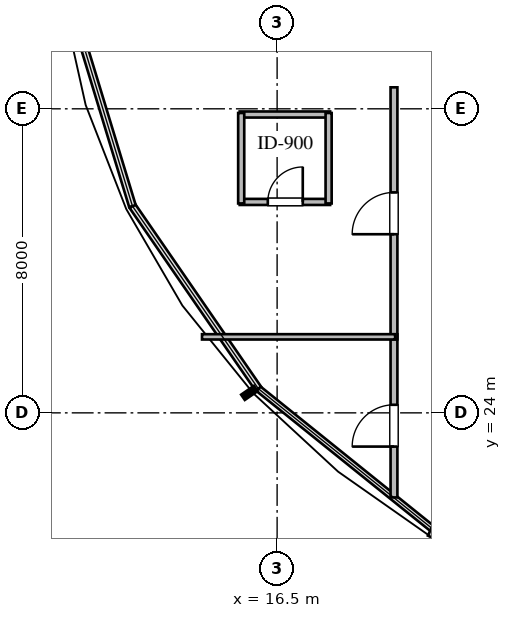
"""IFC4 building model, lengths in metres.
Left out: names, types, materials, properties, quantities, classifications, styles, units other than length and angle.
Written with IfcOpenShell. Run it as: python <this file> out.ifc"""

import sys

from ifc_helpers import new_model, si_unit, direction, frame, frame_2d, origin, place, context, subcontext, project, spatial, rectangle, extrude, element, fill, save


model = new_model("IFC4")
c1 = context("Model", 3, precision=1e-05, world=origin(), true_north=direction((0.0, 1.0)))
c2 = subcontext(c1, "Body", "Model", "MODEL_VIEW")
j1 = project(units=[si_unit("LENGTHUNIT", "METRE"), si_unit("PLANEANGLEUNIT", "RADIAN")], contexts=[c1])
p1 = place(None, origin())
s1 = spatial("IfcSite", under=j1, at=p1, CompositionType="ELEMENT")
p2 = place(p1, origin())
s2 = spatial("IfcBuilding", under=s1, at=p2, CompositionType="ELEMENT")
p3 = place(p2, frame((0.0, 0.0, 178.2)))
s3 = spatial("IfcBuildingStorey", under=s2, at=p3, CompositionType="ELEMENT", Elevation=178.2)
p4 = place(p3, frame((26.994, 17.88, 0.0), z_axis=(0.0, 0.0, 1.0), x_axis=(-0.905106920297, 0.425184034073, 0.0)))
e1 = element("IfcWall", 1, at=p4, inside=s3, PredefinedType="STANDARD", context=c2, shape_type="SweptSolid", body=[
    extrude(rectangle(XDim=7.136, YDim=0.32, at=frame_2d((3.568, 0.0))), origin(), (0.0, 0.0, 1.0), 2.577),
])
p5 = place(p3, frame((15.515, 29.55, 0.0), z_axis=(0.0, 0.0, 1.0), x_axis=(1.0, 0.0, 0.0)))
e2 = element("IfcWall", 2, at=p5, inside=s3, PredefinedType="PLUMBINGWALL", context=c2, shape_type="SweptSolid", body=[
    extrude(rectangle(XDim=2.38, YDim=0.16, at=frame_2d((1.19, 0.0))), origin(), (0.0, 0.0, 1.0), 3.28),
])
p6 = place(p5, frame((0.74, 0.0, 0.0)))
e3 = element("IfcOpeningElement", 3, at=p6, cuts=e2, PredefinedType="OPENING", context=c2, shape_type="SweptSolid", body=[
    extrude(rectangle(XDim=0.92, YDim=2.1, at=frame_2d((0.46, 1.05))), frame((0.0, 0.09, 0.0), z_axis=(0.0, -1.0, 0.0), x_axis=(1.0, 0.0, 0.0)), (0.0, 0.0, 1.0), 0.18),
])
p7 = place(p3, frame((15.515, 31.85, 0.0), z_axis=(0.0, 0.0, 1.0), x_axis=(1.0, 0.0, 0.0)))
e4 = element("IfcWall", 4, at=p7, inside=s3, PredefinedType="PLUMBINGWALL", context=c2, shape_type="SweptSolid", body=[
    extrude(rectangle(XDim=2.38, YDim=0.16, at=frame_2d((1.19, 0.0))), origin(), (0.0, 0.0, 1.0), 3.28),
])
for number, where, z_axis, x_axis in (
    (5, (15.555, 29.51, 0.0), (0.0, 0.0, 1.0), (0.0, 1.0, 0.0)),
    (6, (17.855, 29.51, 0.0), (0.0, 0.0, 1.0), (0.0, 1.0, 0.0)),
):
    element("IfcWall", number, at=place(p3, frame(where, z_axis=z_axis, x_axis=x_axis)), inside=s3, PredefinedType="PLUMBINGWALL", context=c2, shape_type="SweptSolid", body=[
        extrude(rectangle(XDim=2.38, YDim=0.16, at=frame_2d((1.19, 0.0))), origin(), (0.0, 0.0, 1.0), 3.28),
    ])
p8 = place(p3, frame((19.575, 21.775, 0.0), z_axis=(0.0, 0.0, 1.0), x_axis=(0.0, 1.0, 0.0)))
e7 = element("IfcWall", 7, at=p8, inside=s3, PredefinedType="PARTITIONING", context=c2, shape_type="SweptSolid", body=[
    extrude(rectangle(XDim=4.29, YDim=0.18, at=frame_2d((2.145, 0.0))), origin(), (0.0, 0.0, 1.0), 3.28),
])
p9 = place(p8, frame((1.338, 0.0, 0.0)))
e8 = element("IfcOpeningElement", 8, at=p9, cuts=e7, PredefinedType="OPENING", context=c2, shape_type="SweptSolid", body=[
    extrude(rectangle(XDim=1.1, YDim=2.1, at=frame_2d((0.55, 1.05))), frame((0.0, 0.1, 0.0), z_axis=(0.0, -1.0, 0.0), x_axis=(1.0, 0.0, 0.0)), (0.0, 0.0, 1.0), 0.2),
])
p10 = place(p3, frame((19.575, 25.935, 0.0), z_axis=(0.0, 0.0, 1.0), x_axis=(0.0, 1.0, 0.0)))
e9 = element("IfcWall", 9, at=p10, inside=s3, PredefinedType="PARTITIONING", context=c2, shape_type="SweptSolid", body=[
    extrude(rectangle(XDim=6.63, YDim=0.18, at=frame_2d((3.315, 0.0))), origin(), (0.0, 0.0, 1.0), 2.577),
])
p11 = place(p10, frame((2.765, 0.0, 0.0)))
e10 = element("IfcOpeningElement", 10, at=p11, cuts=e9, PredefinedType="OPENING", context=c2, shape_type="SweptSolid", body=[
    extrude(rectangle(XDim=1.1, YDim=2.1, at=frame_2d((0.55, 1.05))), frame((0.0, 0.1, 0.0), z_axis=(0.0, -1.0, 0.0), x_axis=(1.0, 0.0, 0.0)), (0.0, 0.0, 1.0), 0.2),
])
p12 = place(p3, frame((14.524, 26.0, 0.0), z_axis=(0.0, 0.0, 1.0), x_axis=(1.0, 0.0, 0.0)))
e11 = element("IfcWall", 11, at=p12, inside=s3, PredefinedType="PARTITIONING", context=c2, shape_type="SweptSolid", body=[
    extrude(rectangle(XDim=5.081, YDim=0.14, at=frame_2d((2.541, 0.0))), origin(), (0.0, 0.0, 1.0), 3.28),
])
p13 = place(p6, origin())
e12 = element("IfcDoor", 12, at=p13, inside=s3, OperationType="SINGLE_SWING_RIGHT", PredefinedType="DOOR", context=c2, shape_type="SweptSolid", body=[
    extrude(rectangle(XDim=0.92, YDim=2.1, at=frame_2d((0.46, 1.05))), frame((0.0, 0.025, 0.0), z_axis=(0.0, -1.0, 0.0), x_axis=(1.0, 0.0, 0.0)), (0.0, 0.0, 1.0), 0.05),
])
fill(e3, e12)
p14 = place(p9, origin())
e13 = element("IfcDoor", 13, at=p14, inside=s3, OperationType="SINGLE_SWING_LEFT", PredefinedType="DOOR", context=c2, shape_type="SweptSolid", body=[
    extrude(rectangle(XDim=1.1, YDim=2.1, at=frame_2d((0.55, 1.05))), frame((0.0, 0.025, 0.0), z_axis=(0.0, -1.0, 0.0), x_axis=(1.0, 0.0, 0.0)), (0.0, 0.0, 1.0), 0.05),
])
fill(e8, e13)
p15 = place(p11, origin())
e14 = element("IfcDoor", 14, at=p15, inside=s3, OperationType="SINGLE_SWING_LEFT", PredefinedType="DOOR", context=c2, shape_type="SweptSolid", body=[
    extrude(rectangle(XDim=1.1, YDim=2.1, at=frame_2d((0.55, 1.05))), frame((0.0, 0.025, 0.0), z_axis=(0.0, -1.0, 0.0), x_axis=(1.0, 0.0, 0.0)), (0.0, 0.0, 1.0), 0.05),
])
fill(e10, e14)
save(model, sys.argv[1])
